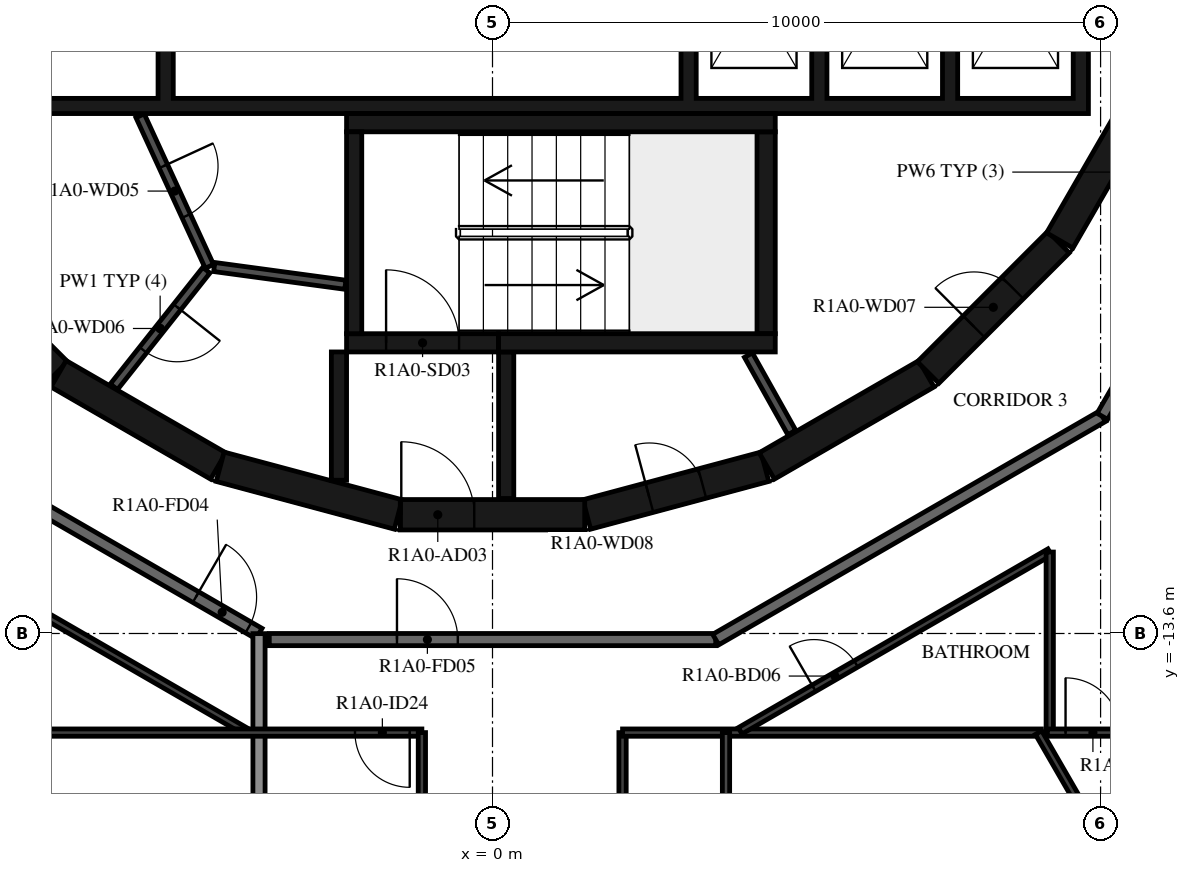
"""IFC4 building model, lengths in metres.
Left out: names, types, materials, properties, quantities, classifications, styles, units other than length and angle.
Written with IfcOpenShell. Run it as: python <this file> out.ifc"""

import sys

from ifc_helpers import new_model, si_unit, direction, frame, frame_2d, origin, place, context, subcontext, project, spatial, polyline, rectangle, outline, extrude, element, fill, save


model = new_model("IFC4")
c1 = context("Model", 3, precision=1e-05, world=origin(), true_north=direction((0.0, 1.0)))
c2 = subcontext(c1, "Body", "Model", "MODEL_VIEW")
j1 = project(units=[si_unit("LENGTHUNIT", "METRE"), si_unit("PLANEANGLEUNIT", "RADIAN")], contexts=[c1])
p1 = place(None, origin())
s1 = spatial("IfcSite", under=j1, at=p1, CompositionType="ELEMENT")
p2 = place(p1, origin())
s2 = spatial("IfcBuilding", under=s1, at=p2, CompositionType="ELEMENT")
p3 = place(p2, frame((0.0, 0.0, 38.4)))
s3 = spatial("IfcBuildingStorey", under=s2, at=p3, CompositionType="ELEMENT", Elevation=38.4)
p4 = place(p3, frame((1.55, -11.643, 0.0), z_axis=(0.0, 0.0, 1.0), x_axis=(0.965948410781, 0.258734743916, 0.0)))
e1 = element("IfcWall", 1, at=p4, inside=s3, PredefinedType="SHEAR", context=c2, shape_type="SweptSolid", body=[
    extrude(rectangle(XDim=3.033, YDim=0.5, at=frame_2d((1.516, 0.0))), origin(), (0.0, 0.0, 1.0), 3.12),
])
p5 = place(p4, frame((1.066, 0.0, 0.0)))
e2 = element("IfcOpeningElement", 2, at=p5, cuts=e1, PredefinedType="OPENING", context=c2, shape_type="SweptSolid", body=[
    extrude(rectangle(XDim=0.9, YDim=2.1, at=frame_2d((0.45, 1.05))), frame((0.0, 0.26, 0.0), z_axis=(0.0, -1.0, 0.0), x_axis=(1.0, 0.0, 0.0)), (0.0, 0.0, 1.0), 0.52),
])
p6 = place(p3, frame((4.51, -10.845, 0.0), z_axis=(0.0, 0.0, 1.0), x_axis=(0.865975092491, 0.500087131594, 0.0)))
e3 = element("IfcWall", 3, at=p6, inside=s3, PredefinedType="SHEAR", context=c2, shape_type="SweptSolid", body=[
    extrude(rectangle(XDim=3.033, YDim=0.5, at=frame_2d((1.516, 0.0))), origin(), (0.0, 0.0, 1.0), 3.12),
])
p7 = place(p3, frame((7.164, -9.308, 0.0), z_axis=(0.0, 0.0, 1.0), x_axis=(0.707106781187, 0.707106781187, 0.0)))
e4 = element("IfcWall", 4, at=p7, inside=s3, PredefinedType="SHEAR", context=c2, shape_type="SweptSolid", body=[
    extrude(rectangle(XDim=3.032, YDim=0.5, at=frame_2d((1.516, 0.0))), origin(), (0.0, 0.0, 1.0), 3.12),
])
p8 = place(p7, frame((1.066, 0.0, 0.0)))
e5 = element("IfcOpeningElement", 5, at=p8, cuts=e4, PredefinedType="OPENING", context=c2, shape_type="SweptSolid", body=[
    extrude(rectangle(XDim=0.9, YDim=2.1, at=frame_2d((0.45, 1.05))), frame((0.0, 0.26, 0.0), z_axis=(0.0, -1.0, 0.0), x_axis=(1.0, 0.0, 0.0)), (0.0, 0.0, 1.0), 0.52),
])
p9 = place(p3, frame((9.329, -7.137, 0.0), z_axis=(0.0, 0.0, 1.0), x_axis=(0.500087131594, 0.865975092491, 0.0)))
e6 = element("IfcWall", 6, at=p9, inside=s3, PredefinedType="SHEAR", context=c2, shape_type="SweptSolid", body=[
    extrude(rectangle(XDim=3.033, YDim=0.5, at=frame_2d((1.516, 0.0))), origin(), (0.0, 0.0, 1.0), 3.12),
])
p10 = place(p3, frame((-9.308, -7.164, 0.0), z_axis=(0.0, 0.0, 1.0), x_axis=(0.707106781187, -0.707106781187, 0.0)))
e7 = element("IfcWall", 7, at=p10, inside=s3, PredefinedType="SHEAR", context=c2, shape_type="SweptSolid", body=[
    extrude(rectangle(XDim=3.032, YDim=0.5, at=frame_2d((1.516, 0.0))), origin(), (0.0, 0.0, 1.0), 3.12),
])
for number, where, z_axis, x_axis in (
    (8, (-7.137, -9.329, 0.0), (0.0, 0.0, 1.0), (0.866, -0.5, 0.0)),
    (9, (-4.479, -10.858, 0.0), (0.0, 0.0, 1.0), (0.966, -0.259, 0.0)),
):
    element("IfcWall", number, at=place(p3, frame(where, z_axis=z_axis, x_axis=x_axis)), inside=s3, PredefinedType="SHEAR", context=c2, shape_type="SweptSolid", body=[
        extrude(rectangle(XDim=3.033, YDim=0.5, at=frame_2d((1.516, 0.0))), origin(), (0.0, 0.0, 1.0), 3.12),
    ])
p11 = place(p3, frame((-1.516, -11.647, 0.0), z_axis=(0.0, 0.0, 1.0), x_axis=(1.0, 0.0, 0.0)))
e10 = element("IfcWall", 10, at=p11, inside=s3, PredefinedType="SHEAR", context=c2, shape_type="SweptSolid", body=[
    extrude(rectangle(XDim=3.033, YDim=0.5, at=frame_2d((1.516, 0.0))), origin(), (0.0, 0.0, 1.0), 3.12),
])
p12 = place(p11, frame((0.016, 0.0, 0.0)))
e11 = element("IfcOpeningElement", 11, at=p12, cuts=e10, PredefinedType="OPENING", context=c2, shape_type="SweptSolid", body=[
    extrude(rectangle(XDim=1.2, YDim=2.1, at=frame_2d((0.6, 1.05))), frame((0.0, 0.26, 0.0), z_axis=(0.0, -1.0, 0.0), x_axis=(1.0, 0.0, 0.0)), (0.0, 0.0, 1.0), 0.52),
])
p13 = place(p3, frame((-2.275, -8.67, 0.0), z_axis=(0.0, 0.0, 1.0), x_axis=(0.0, 1.0, 0.0)))
e12 = element("IfcWall", 12, at=p13, inside=s3, PredefinedType="SHEAR", context=c2, shape_type="SweptSolid", body=[
    extrude(rectangle(XDim=3.32, YDim=0.25, at=frame_2d((1.66, 0.0))), origin(), (0.0, 0.0, 1.0), 3.12),
])
p14 = place(p3, frame((-2.4, -5.2, 0.0), z_axis=(0.0, 0.0, 1.0), x_axis=(1.0, 0.0, 0.0)))
e13 = element("IfcWall", 13, at=p14, inside=s3, PredefinedType="SHEAR", context=c2, shape_type="SweptSolid", body=[
    extrude(rectangle(XDim=7.05, YDim=0.3, at=frame_2d((3.525, 0.0))), origin(), (0.0, 0.0, 1.0), 3.12),
])
p15 = place(p3, frame((4.5, -8.67, 0.0), z_axis=(0.0, 0.0, 1.0), x_axis=(0.0, 1.0, 0.0)))
e14 = element("IfcWall", 14, at=p15, inside=s3, PredefinedType="SHEAR", context=c2, shape_type="SweptSolid", body=[
    extrude(rectangle(XDim=3.32, YDim=0.3, at=frame_2d((1.66, 0.0))), origin(), (0.0, 0.0, 1.0), 3.12),
])
p16 = place(p3, frame((0.1, -8.82, 0.0), z_axis=(0.0, 0.0, 1.0), x_axis=(1.0, 0.0, 0.0)))
e15 = element("IfcWall", 15, at=p16, inside=s3, PredefinedType="SHEAR", context=c2, shape_type="SweptSolid", body=[
    extrude(rectangle(XDim=4.55, YDim=0.3, at=frame_2d((2.275, 0.0))), origin(), (0.0, 0.0, 1.0), 3.12),
])
p17 = place(p3, frame((-2.4, -8.82, 0.0), z_axis=(0.0, 0.0, 1.0), x_axis=(1.0, 0.0, 0.0)))
e16 = element("IfcWall", 16, at=p17, inside=s3, PredefinedType="SHEAR", context=c2, shape_type="SweptSolid", body=[
    extrude(rectangle(XDim=2.5, YDim=0.3, at=frame_2d((1.25, 0.0))), origin(), (0.0, 0.0, 1.0), 3.12),
])
p18 = place(p17, frame((0.65, 0.0, 0.0)))
e17 = element("IfcOpeningElement", 17, at=p18, cuts=e16, PredefinedType="OPENING", context=c2, shape_type="SweptSolid", body=[
    extrude(rectangle(XDim=1.2, YDim=2.1, at=frame_2d((0.6, 1.05))), frame((0.0, 0.16, 0.0), z_axis=(0.0, -1.0, 0.0), x_axis=(1.0, 0.0, 0.0)), (0.0, 0.0, 1.0), 0.32),
])
p19 = place(p3, frame((-2.525, -8.97, 0.0), z_axis=(0.0, 0.0, 1.0), x_axis=(0.0, -1.0, 0.0)))
e18 = element("IfcWall", 18, at=p19, inside=s3, PredefinedType="SHEAR", context=c2, shape_type="SweptSolid", body=[
    extrude(rectangle(XDim=2.11, YDim=0.25, at=frame_2d((1.055, 0.0))), origin(), (0.0, 0.0, 1.0), 3.12),
])
p20 = place(p3, frame((0.225, -8.97, 0.0), z_axis=(0.0, 0.0, 1.0), x_axis=(0.0, -1.0, 0.0)))
e19 = element("IfcWall", 19, at=p20, inside=s3, PredefinedType="SHEAR", context=c2, shape_type="SweptSolid", body=[
    extrude(rectangle(XDim=2.41, YDim=0.25, at=frame_2d((1.205, 0.0))), origin(), (0.0, 0.0, 1.0), 3.12),
])
p21 = place(p3, origin())
e20 = element("IfcWall", 20, at=p21, inside=s3, PredefinedType="SHEAR", context=c2, shape_type="SweptSolid", body=[
    extrude(outline(polyline([(9.8, -5.05), (9.8, -4.8), (9.8, -1.9), (9.55, -1.9), (9.55, -4.8), (7.65, -4.8), (7.65, -1.9), (7.4, -1.9), (7.4, -4.8), (5.5, -4.8), (5.5, -1.9), (5.25, -1.9), (5.25, -4.8), (3.35, -4.8), (3.35, -1.9), (3.1, -1.9), (3.1, -4.8), (-5.25, -4.8), (-5.25, -1.9), (-5.5, -1.9), (-5.5, -4.8), (-7.4, -4.8), (-7.4, -1.9), (-7.65, -1.9), (-7.65, -4.8), (-9.55, -4.8), (-9.55, -1.9), (-9.8, -1.9), (-9.8, -4.8), (-9.8, -5.05), (9.8, -5.05)])), origin(), (0.0, 0.0, 1.0), 3.12),
])
p22 = place(p3, frame((4.922, -10.296, 0.0), z_axis=(0.0, 0.0, 1.0), x_axis=(-0.48860846254, 0.872503163509, 0.0)))
e21 = element("IfcWall", 21, at=p22, inside=s3, PredefinedType="PARTITIONING", context=c2, shape_type="SweptSolid", body=[
    extrude(rectangle(XDim=1.459, YDim=0.15, at=frame_2d((0.73, 0.0))), origin(), (0.0, 0.0, 1.0), 3.12),
])
p23 = place(p3, frame((-5.795, -5.086, 0.0), z_axis=(0.0, 0.0, 1.0), x_axis=(0.417887867606, -0.908498613157, 0.0)))
e22 = element("IfcWall", 22, at=p23, inside=s3, PredefinedType="PARTITIONING", context=c2, shape_type="SweptSolid", body=[
    extrude(rectangle(XDim=2.726, YDim=0.15, at=frame_2d((1.363, 0.0))), origin(), (0.0, 0.0, 1.0), 3.12),
])
p24 = place(p23, frame((0.913, 0.0, 0.0)))
e23 = element("IfcOpeningElement", 23, at=p24, cuts=e22, PredefinedType="OPENING", context=c2, shape_type="SweptSolid", body=[
    extrude(rectangle(XDim=0.9, YDim=2.1, at=frame_2d((0.45, 1.05))), frame((0.0, 0.085, 0.0), z_axis=(0.0, -1.0, 0.0), x_axis=(1.0, 0.0, 0.0)), (0.0, 0.0, 1.0), 0.17),
])
p25 = place(p3, frame((-4.706, -7.625, 0.0), z_axis=(0.0, 0.0, 1.0), x_axis=(-0.621392599334, -0.783499353856, 0.0)))
e24 = element("IfcWall", 24, at=p25, inside=s3, PredefinedType="PARTITIONING", context=c2, shape_type="SweptSolid", body=[
    extrude(rectangle(XDim=2.447, YDim=0.15, at=frame_2d((1.224, 0.0))), origin(), (0.0, 0.0, 1.0), 3.12),
])
p26 = place(p25, frame((0.774, 0.0, 0.0)))
e25 = element("IfcOpeningElement", 25, at=p26, cuts=e24, PredefinedType="OPENING", context=c2, shape_type="SweptSolid", body=[
    extrude(rectangle(XDim=0.9, YDim=2.1, at=frame_2d((0.45, 1.05))), frame((0.0, 0.085, 0.0), z_axis=(0.0, -1.0, 0.0), x_axis=(1.0, 0.0, 0.0)), (0.0, 0.0, 1.0), 0.17),
])
p27 = place(p3, frame((-2.42, -7.865, 0.0), z_axis=(0.0, 0.0, 1.0), x_axis=(-0.990972299108, 0.134066783362, 0.0)))
e26 = element("IfcWall", 26, at=p27, inside=s3, PredefinedType="PARTITIONING", context=c2, shape_type="SweptSolid", body=[
    extrude(rectangle(XDim=2.176, YDim=0.15, at=frame_2d((1.088, 0.0))), origin(), (0.0, 0.0, 1.0), 3.12),
])
p28 = place(p3, frame((-10.029, -10.029, 0.0), z_axis=(0.0, 0.0, 1.0), x_axis=(0.866022878987, -0.500004373052, 0.0)))
e27 = element("IfcWall", 27, at=p28, inside=s3, PredefinedType="STANDARD", context=c2, shape_type="SweptSolid", body=[
    extrude(rectangle(XDim=7.146, YDim=0.2, at=frame_2d((3.573, 0.0))), origin(), (0.0, 0.0, 1.0), 3.12),
])
p29 = place(p28, frame((5.947, 0.0, 0.0)))
e28 = element("IfcOpeningElement", 28, at=p29, cuts=e27, PredefinedType="OPENING", context=c2, shape_type="SweptSolid", body=[
    extrude(rectangle(XDim=1.0, YDim=2.1, at=frame_2d((0.5, 1.05))), frame((0.0, 0.11, 0.0), z_axis=(0.0, -1.0, 0.0), x_axis=(1.0, 0.0, 0.0)), (0.0, 0.0, 1.0), 0.22),
])
p30 = place(p3, frame((-3.671, -13.7, 0.0), z_axis=(0.0, 0.0, 1.0), x_axis=(1.0, 0.0, 0.0)))
e29 = element("IfcWall", 29, at=p30, inside=s3, PredefinedType="STANDARD", context=c2, shape_type="SweptSolid", body=[
    extrude(rectangle(XDim=7.342, YDim=0.2, at=frame_2d((3.671, 0.0))), origin(), (0.0, 0.0, 1.0), 3.12),
])
p31 = place(p30, frame((2.1, 0.0, 0.0)))
e30 = element("IfcOpeningElement", 30, at=p31, cuts=e29, PredefinedType="OPENING", context=c2, shape_type="SweptSolid", body=[
    extrude(rectangle(XDim=1.0, YDim=2.1, at=frame_2d((0.5, 1.05))), frame((0.0, 0.11, 0.0), z_axis=(0.0, -1.0, 0.0), x_axis=(1.0, 0.0, 0.0)), (0.0, 0.0, 1.0), 0.22),
])
p32 = place(p3, frame((3.671, -13.7, 0.0), z_axis=(0.0, 0.0, 1.0), x_axis=(0.866024439905, 0.500001669485, 0.0)))
e31 = element("IfcWall", 31, at=p32, inside=s3, PredefinedType="STANDARD", context=c2, shape_type="SweptSolid", body=[
    extrude(rectangle(XDim=7.342, YDim=0.2, at=frame_2d((3.671, 0.0))), origin(), (0.0, 0.0, 1.0), 3.12),
])
p33 = place(p3, frame((10.029, -10.029, 0.0), z_axis=(0.0, 0.0, 1.0), x_axis=(0.50001606911, 0.866016126081, 0.0)))
e32 = element("IfcWall", 32, at=p33, inside=s3, PredefinedType="STANDARD", context=c2, shape_type="SweptSolid", body=[
    extrude(rectangle(XDim=3.671, YDim=0.2, at=frame_2d((1.835, 0.0))), origin(), (0.0, 0.0, 1.0), 3.12),
])
p34 = place(p3, frame((-3.84, -19.63, 0.0), z_axis=(0.0, 0.0, 1.0), x_axis=(0.0, 1.0, 0.0)))
e33 = element("IfcWall", 33, at=p34, inside=s3, PredefinedType="STANDARD", context=c2, shape_type="SweptSolid", body=[
    extrude(rectangle(XDim=6.028, YDim=0.2, at=frame_2d((3.014, 0.0))), origin(), (0.0, 0.0, 1.0), 2.73),
])
p35 = place(p3, frame((-11.127, -11.127, 0.0), z_axis=(0.0, 0.0, 1.0), x_axis=(0.866032360344, -0.499987950692, 0.0)))
e34 = element("IfcWall", 34, at=p35, inside=s3, PredefinedType="PARTITIONING", context=c2, shape_type="SweptSolid", body=[
    extrude(rectangle(XDim=8.146, YDim=0.12, at=frame_2d((4.073, 0.0))), origin(), (0.0, 0.0, 1.0), 3.12),
])
p36 = place(p35, frame((1.357, 0.0, 0.0)))
e35 = element("IfcOpeningElement", 35, at=p36, cuts=e34, PredefinedType="OPENING", context=c2, shape_type="SweptSolid", body=[
    extrude(rectangle(XDim=0.8, YDim=2.1, at=frame_2d((0.4, 1.05))), frame((0.0, 0.07, 0.0), z_axis=(0.0, -1.0, 0.0), x_axis=(1.0, 0.0, 0.0)), (0.0, 0.0, 1.0), 0.14),
])
p37 = place(p3, frame((-1.161, -15.23, 0.0), z_axis=(0.0, 0.0, 1.0), x_axis=(-1.0, 0.0, 0.0)))
e36 = element("IfcWall", 36, at=p37, inside=s3, PredefinedType="PARTITIONING", context=c2, shape_type="SweptSolid", body=[
    extrude(rectangle(XDim=18.726, YDim=0.12, at=frame_2d((9.363, 0.0))), origin(), (0.0, 0.0, 1.0), 3.12),
])
p38 = place(p37, frame((9.297, 0.0, 0.0)))
e37 = element("IfcOpeningElement", 37, at=p38, cuts=e36, PredefinedType="OPENING", context=c2, shape_type="SweptSolid", body=[
    extrude(rectangle(XDim=0.9, YDim=2.1, at=frame_2d((0.45, 1.05))), frame((0.0, 0.07, 0.0), z_axis=(0.0, -1.0, 0.0), x_axis=(1.0, 0.0, 0.0)), (0.0, 0.0, 1.0), 0.14),
])
p39 = place(p37, frame((15.755, 0.0, 0.0)))
e38 = element("IfcOpeningElement", 38, at=p39, cuts=e36, PredefinedType="OPENING", context=c2, shape_type="SweptSolid", body=[
    extrude(rectangle(XDim=0.9, YDim=2.1, at=frame_2d((0.45, 1.05))), frame((0.0, 0.07, 0.0), z_axis=(0.0, -1.0, 0.0), x_axis=(1.0, 0.0, 0.0)), (0.0, 0.0, 1.0), 0.14),
])
p40 = place(p37, frame((0.2, 0.0, 0.0)))
e39 = element("IfcOpeningElement", 39, at=p40, cuts=e36, PredefinedType="OPENING", context=c2, shape_type="SweptSolid", body=[
    extrude(rectangle(XDim=0.9, YDim=2.1, at=frame_2d((0.45, 1.05))), frame((0.0, 0.07, 0.0), z_axis=(0.0, -1.0, 0.0), x_axis=(1.0, 0.0, 0.0)), (0.0, 0.0, 1.0), 0.14),
])
for number, where, z_axis, x_axis in (
    (40, (-1.161, -15.23, 0.0), (0.0, 0.0, 1.0), (0.0, -1.0, 0.0)),
    (41, (2.139, -17.845, 0.0), (0.0, 0.0, 1.0), (0.0, 1.0, 0.0)),
):
    element("IfcWall", number, at=place(p3, frame(where, z_axis=z_axis, x_axis=x_axis)), inside=s3, PredefinedType="PARTITIONING", context=c2, shape_type="SweptSolid", body=[
        extrude(rectangle(XDim=2.615, YDim=0.12, at=frame_2d((1.308, 0.0))), origin(), (0.0, 0.0, 1.0), 3.12),
    ])
p41 = place(p3, frame((2.139, -15.23, 0.0), z_axis=(0.0, 0.0, 1.0), x_axis=(1.0, 0.0, 0.0)))
e42 = element("IfcWall", 42, at=p41, inside=s3, PredefinedType="PARTITIONING", context=c2, shape_type="SweptSolid", body=[
    extrude(rectangle(XDim=6.887, YDim=0.12, at=frame_2d((3.444, 0.0))), origin(), (0.0, 0.0, 1.0), 3.12),
])
p42 = place(p3, frame((4.073, -15.2, 0.0), z_axis=(0.0, 0.0, 1.0), x_axis=(0.866034128446, 0.499984888139, 0.0)))
e43 = element("IfcWall", 43, at=p42, inside=s3, PredefinedType="PARTITIONING", context=c2, shape_type="SweptSolid", body=[
    extrude(rectangle(XDim=5.879, YDim=0.12, at=frame_2d((2.939, 0.0))), origin(), (0.0, 0.0, 1.0), 3.12),
])
p43 = place(p42, frame((1.4, 0.0, 0.0)))
e44 = element("IfcOpeningElement", 44, at=p43, cuts=e43, PredefinedType="OPENING", context=c2, shape_type="SweptSolid", body=[
    extrude(rectangle(XDim=0.8, YDim=2.1, at=frame_2d((0.4, 1.05))), frame((0.0, 0.07, 0.0), z_axis=(0.0, -1.0, 0.0), x_axis=(1.0, 0.0, 0.0)), (0.0, 0.0, 1.0), 0.14),
])
p44 = place(p3, frame((9.164, -12.261, 0.0), z_axis=(0.0, 0.0, 1.0), x_axis=(0.0, -1.0, 0.0)))
e45 = element("IfcWall", 45, at=p44, inside=s3, PredefinedType="PARTITIONING", context=c2, shape_type="SweptSolid", body=[
    extrude(rectangle(XDim=2.969, YDim=0.12, at=frame_2d((1.485, 0.0))), origin(), (0.0, 0.0, 1.0), 3.12),
])
p45 = place(p3, frame((9.124, -15.23, 0.0), z_axis=(0.0, 0.0, 1.0), x_axis=(1.0, 0.0, 0.0)))
e46 = element("IfcWall", 46, at=p45, inside=s3, PredefinedType="PARTITIONING", context=c2, shape_type="SweptSolid", body=[
    extrude(rectangle(XDim=10.764, YDim=0.12, at=frame_2d((5.382, 0.0))), origin(), (0.0, 0.0, 1.0), 3.12),
])
p46 = place(p45, frame((0.3, 0.0, 0.0)))
e47 = element("IfcOpeningElement", 47, at=p46, cuts=e46, PredefinedType="OPENING", context=c2, shape_type="SweptSolid", body=[
    extrude(rectangle(XDim=0.9, YDim=2.1, at=frame_2d((0.45, 1.05))), frame((0.0, 0.07, 0.0), z_axis=(0.0, -1.0, 0.0), x_axis=(1.0, 0.0, 0.0)), (0.0, 0.0, 1.0), 0.14),
])
p47 = place(p45, frame((7.665, 0.0, 0.0)))
e48 = element("IfcOpeningElement", 48, at=p47, cuts=e46, PredefinedType="OPENING", context=c2, shape_type="SweptSolid", body=[
    extrude(rectangle(XDim=0.9, YDim=2.1, at=frame_2d((0.45, 1.05))), frame((0.0, 0.07, 0.0), z_axis=(0.0, -1.0, 0.0), x_axis=(1.0, 0.0, 0.0)), (0.0, 0.0, 1.0), 0.14),
])
p48 = place(p3, frame((3.84, -19.63, 0.0), z_axis=(0.0, 0.0, 1.0), x_axis=(0.0, 1.0, 0.0)))
e49 = element("IfcWall", 49, at=p48, inside=s3, PredefinedType="PARTITIONING", context=c2, shape_type="SweptSolid", body=[
    extrude(rectangle(XDim=4.4, YDim=0.12, at=frame_2d((2.2, 0.0))), origin(), (0.0, 0.0, 1.0), 2.73),
])
p49 = place(p3, frame((11.52, -19.63, 0.0), z_axis=(0.0, 0.0, 1.0), x_axis=(-0.499999763888, 0.866025540104, 0.0)))
e50 = element("IfcWall", 50, at=p49, inside=s3, PredefinedType="PARTITIONING", context=c2, shape_type="SweptSolid", body=[
    extrude(rectangle(XDim=5.081, YDim=0.12, at=frame_2d((2.54, 0.0))), origin(), (0.0, 0.0, 1.0), 3.12),
])
p50 = place(p49, frame((0.4, 0.0, 0.0)))
e51 = element("IfcOpeningElement", 51, at=p50, cuts=e50, PredefinedType="OPENING", context=c2, shape_type="SweptSolid", body=[
    extrude(rectangle(XDim=0.9, YDim=2.1, at=frame_2d((0.45, 1.05))), frame((0.0, 0.07, 0.0), z_axis=(0.0, -1.0, 0.0), x_axis=(1.0, 0.0, 0.0)), (0.0, 0.0, 1.0), 0.14),
])
p51 = place(p18, origin())
e52 = element("IfcDoor", 52, at=p51, inside=s3, OperationType="SINGLE_SWING_LEFT", PredefinedType="DOOR", context=c2, shape_type="SweptSolid", body=[
    extrude(rectangle(XDim=1.2, YDim=2.1, at=frame_2d((0.6, 1.05))), frame((0.0, 0.025, 0.0), z_axis=(0.0, -1.0, 0.0), x_axis=(1.0, 0.0, 0.0)), (0.0, 0.0, 1.0), 0.05),
])
fill(e17, e52)
p52 = place(p12, origin())
e53 = element("IfcDoor", 53, at=p52, inside=s3, OperationType="SINGLE_SWING_RIGHT", PredefinedType="DOOR", context=c2, shape_type="SweptSolid", body=[
    extrude(rectangle(XDim=1.2, YDim=2.1, at=frame_2d((0.6, 1.05))), frame((0.0, 0.025, 0.0), z_axis=(0.0, -1.0, 0.0), x_axis=(1.0, 0.0, 0.0)), (0.0, 0.0, 1.0), 0.05),
])
fill(e11, e53)
p53 = place(p24, origin())
e54 = element("IfcDoor", 54, at=p53, inside=s3, OperationType="SINGLE_SWING_RIGHT", PredefinedType="DOOR", context=c2, shape_type="SweptSolid", body=[
    extrude(rectangle(XDim=0.9, YDim=2.1, at=frame_2d((0.45, 1.05))), frame((0.0, 0.025, 0.0), z_axis=(0.0, -1.0, 0.0), x_axis=(1.0, 0.0, 0.0)), (0.0, 0.0, 1.0), 0.05),
])
fill(e23, e54)
p54 = place(p26, origin())
e55 = element("IfcDoor", 55, at=p54, inside=s3, OperationType="SINGLE_SWING_LEFT", PredefinedType="DOOR", context=c2, shape_type="SweptSolid", body=[
    extrude(rectangle(XDim=0.9, YDim=2.1, at=frame_2d((0.45, 1.05))), frame((0.0, 0.025, 0.0), z_axis=(0.0, -1.0, 0.0), x_axis=(1.0, 0.0, 0.0)), (0.0, 0.0, 1.0), 0.05),
])
fill(e25, e55)
p55 = place(p8, origin())
e56 = element("IfcDoor", 56, at=p55, inside=s3, OperationType="SINGLE_SWING_RIGHT", PredefinedType="DOOR", context=c2, shape_type="SweptSolid", body=[
    extrude(rectangle(XDim=0.9, YDim=2.1, at=frame_2d((0.45, 1.05))), frame((0.0, 0.025, 0.0), z_axis=(0.0, -1.0, 0.0), x_axis=(1.0, 0.0, 0.0)), (0.0, 0.0, 1.0), 0.05),
])
fill(e5, e56)
p56 = place(p5, origin())
e57 = element("IfcDoor", 57, at=p56, inside=s3, OperationType="SINGLE_SWING_LEFT", PredefinedType="DOOR", context=c2, shape_type="SweptSolid", body=[
    extrude(rectangle(XDim=0.9, YDim=2.1, at=frame_2d((0.45, 1.05))), frame((0.0, 0.025, 0.0), z_axis=(0.0, -1.0, 0.0), x_axis=(1.0, 0.0, 0.0)), (0.0, 0.0, 1.0), 0.05),
])
fill(e2, e57)
p57 = place(p29, origin())
e58 = element("IfcDoor", 58, at=p57, inside=s3, OperationType="SINGLE_SWING_LEFT", PredefinedType="DOOR", context=c2, shape_type="SweptSolid", body=[
    extrude(rectangle(XDim=1.0, YDim=2.1, at=frame_2d((0.5, 1.05))), frame((0.0, 0.025, 0.0), z_axis=(0.0, -1.0, 0.0), x_axis=(1.0, 0.0, 0.0)), (0.0, 0.0, 1.0), 0.05),
])
fill(e28, e58)
p58 = place(p31, origin())
e59 = element("IfcDoor", 59, at=p58, inside=s3, OperationType="SINGLE_SWING_LEFT", PredefinedType="DOOR", context=c2, shape_type="SweptSolid", body=[
    extrude(rectangle(XDim=1.0, YDim=2.1, at=frame_2d((0.5, 1.05))), frame((0.0, 0.025, 0.0), z_axis=(0.0, -1.0, 0.0), x_axis=(1.0, 0.0, 0.0)), (0.0, 0.0, 1.0), 0.05),
])
fill(e30, e59)
p59 = place(p40, origin())
e60 = element("IfcDoor", 60, at=p59, inside=s3, OperationType="SINGLE_SWING_LEFT", PredefinedType="DOOR", context=c2, shape_type="SweptSolid", body=[
    extrude(rectangle(XDim=0.9, YDim=2.1, at=frame_2d((0.45, 1.05))), frame((0.0, 0.025, 0.0), z_axis=(0.0, -1.0, 0.0), x_axis=(1.0, 0.0, 0.0)), (0.0, 0.0, 1.0), 0.05),
])
fill(e39, e60)
p60 = place(p43, origin())
e61 = element("IfcDoor", 61, at=p60, inside=s3, OperationType="SINGLE_SWING_RIGHT", PredefinedType="DOOR", context=c2, shape_type="SweptSolid", body=[
    extrude(rectangle(XDim=0.8, YDim=2.1, at=frame_2d((0.4, 1.05))), frame((0.0, 0.025, 0.0), z_axis=(0.0, -1.0, 0.0), x_axis=(1.0, 0.0, 0.0)), (0.0, 0.0, 1.0), 0.05),
])
fill(e44, e61)
p61 = place(p46, origin())
e62 = element("IfcDoor", 62, at=p61, inside=s3, OperationType="SINGLE_SWING_RIGHT", PredefinedType="DOOR", context=c2, shape_type="SweptSolid", body=[
    extrude(rectangle(XDim=0.9, YDim=2.1, at=frame_2d((0.45, 1.05))), frame((0.0, 0.025, 0.0), z_axis=(0.0, -1.0, 0.0), x_axis=(1.0, 0.0, 0.0)), (0.0, 0.0, 1.0), 0.05),
])
fill(e47, e62)
save(model, sys.argv[1])
